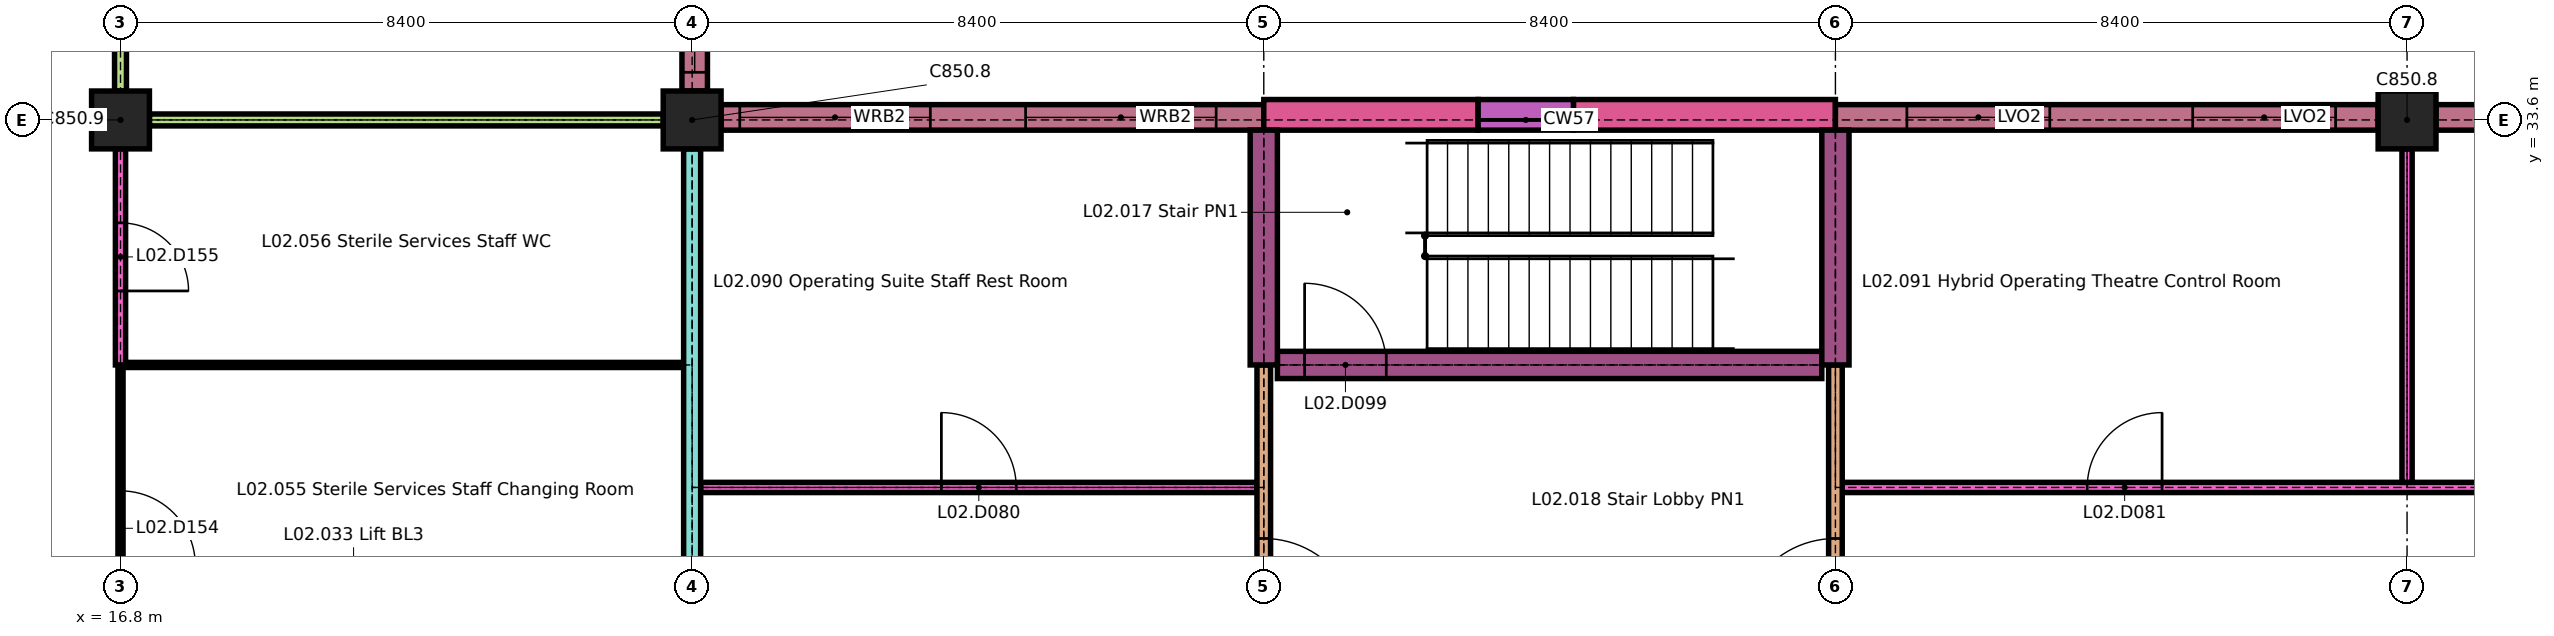
"""IFC4 building model, lengths in metres.
Left out: names, types, materials, properties, quantities, classifications, styles, units other than length and angle.
Written with IfcOpenShell. Run it as: python <this file> out.ifc"""

import sys

from ifc_helpers import new_model, si_unit, direction, frame, frame_2d, origin, origin_2d, place, context, subcontext, project, spatial, rectangle, extrude, element, fill, save


model = new_model("IFC4")
c1 = context("Model", 3, precision=1e-05, world=origin(), true_north=direction((0.0, 1.0)))
c2 = subcontext(c1, "Body", "Model", "MODEL_VIEW")
j1 = project(units=[si_unit("LENGTHUNIT", "METRE"), si_unit("PLANEANGLEUNIT", "RADIAN")], contexts=[c1])
p1 = place(None, origin())
s1 = spatial("IfcSite", under=j1, at=p1, CompositionType="ELEMENT")
p2 = place(p1, origin())
s2 = spatial("IfcBuilding", under=s1, at=p2, CompositionType="ELEMENT")
p3 = place(p2, frame((0.0, 0.0, 8.4)))
s3 = spatial("IfcBuildingStorey", under=s2, at=p3, CompositionType="ELEMENT", Elevation=8.4)
for number, where, z_axis, x_axis in (
    (1, (16.8, 33.6, 0.0), (0.0, 0.0, 1.0), (1.0, 0.0, 0.0)),
    (2, (25.2, 33.6, 0.0), (0.0, 0.0, 1.0), (1.0, 0.0, 0.0)),
    (3, (50.4, 33.6, 0.0), (0.0, 0.0, 1.0), (1.0, 0.0, 0.0)),
):
    element("IfcColumn", number, at=place(p3, frame(where, z_axis=z_axis, x_axis=x_axis)), inside=s3, PredefinedType="COLUMN", context=c2, shape_type="SweptSolid", body=[
        extrude(rectangle(XDim=0.85, YDim=0.85, at=origin_2d()), origin(), (0.0, 0.0, 1.0), 4.2),
    ])
p4 = place(p3, frame((25.625, 33.637, 0.0), z_axis=(0.0, 0.0, 1.0), x_axis=(1.0, 0.0, 0.0)))
e4 = element("IfcWall", 4, at=p4, inside=s3, PredefinedType="SOLIDWALL", context=c2, shape_type="SweptSolid", body=[
    extrude(rectangle(XDim=7.975, YDim=0.375, at=frame_2d((3.988, 0.0))), origin(), (0.0, 0.0, 1.0), 3.9),
])
p5 = place(p4, frame((0.275, 0.0, 1.0)))
e5 = element("IfcOpeningElement", 5, at=p5, cuts=e4, PredefinedType="OPENING", context=c2, shape_type="SweptSolid", body=[
    extrude(rectangle(XDim=2.8, YDim=1.5, at=frame_2d((1.4, 0.75))), frame((0.0, 0.198, 0.0), z_axis=(0.0, -1.0, 0.0), x_axis=(1.0, 0.0, 0.0)), (0.0, 0.0, 1.0), 0.395),
])
p6 = place(p4, frame((4.475, 0.0, 1.0)))
e6 = element("IfcOpeningElement", 6, at=p6, cuts=e4, PredefinedType="OPENING", context=c2, shape_type="SweptSolid", body=[
    extrude(rectangle(XDim=2.8, YDim=1.5, at=frame_2d((1.4, 0.75))), frame((0.0, 0.198, 0.0), z_axis=(0.0, -1.0, 0.0), x_axis=(1.0, 0.0, 0.0)), (0.0, 0.0, 1.0), 0.395),
])
p7 = place(p3, frame((33.6, 33.675, 0.0), z_axis=(0.0, 0.0, 1.0), x_axis=(1.0, 0.0, 0.0)))
e7 = element("IfcWall", 7, at=p7, inside=s3, PredefinedType="SOLIDWALL", context=c2, shape_type="SweptSolid", body=[
    extrude(rectangle(XDim=3.15, YDim=0.45, at=frame_2d((1.575, 0.0))), origin(), (0.0, 0.0, 1.0), 4.2),
])
p8 = place(p3, frame((38.15, 33.675, 0.0), z_axis=(0.0, 0.0, 1.0), x_axis=(1.0, 0.0, 0.0)))
e8 = element("IfcWall", 8, at=p8, inside=s3, PredefinedType="SOLIDWALL", context=c2, shape_type="SweptSolid", body=[
    extrude(rectangle(XDim=3.85, YDim=0.45, at=frame_2d((1.925, 0.0))), origin(), (0.0, 0.0, 1.0), 4.2),
])
p9 = place(p3, frame((36.75, 33.675, 0.0), z_axis=(0.0, 0.0, 1.0), x_axis=(1.0, 0.0, 0.0)))
e9 = element("IfcWall", 9, at=p9, inside=s3, PredefinedType="SOLIDWALL", context=c2, shape_type="SweptSolid", body=[
    extrude(rectangle(XDim=1.4, YDim=0.45, at=frame_2d((0.7, 0.0))), origin(), (0.0, 0.0, 1.0), 0.6),
])
p10 = place(p3, frame((42.0, 33.637, 0.0), z_axis=(0.0, 0.0, 1.0), x_axis=(1.0, 0.0, 0.0)))
e10 = element("IfcWall", 10, at=p10, inside=s3, PredefinedType="SOLIDWALL", context=c2, shape_type="SweptSolid", body=[
    extrude(rectangle(XDim=7.975, YDim=0.375, at=frame_2d((3.988, 0.0))), origin(), (0.0, 0.0, 1.0), 3.9),
])
p11 = place(p10, frame((1.05, 0.0, 0.9)))
e11 = element("IfcOpeningElement", 11, at=p11, cuts=e10, PredefinedType="OPENING", context=c2, shape_type="SweptSolid", body=[
    extrude(rectangle(XDim=2.1, YDim=2.4, at=frame_2d((1.05, 1.2))), frame((0.0, 0.198, 0.0), z_axis=(0.0, -1.0, 0.0), x_axis=(1.0, 0.0, 0.0)), (0.0, 0.0, 1.0), 0.395),
])
p12 = place(p10, frame((5.25, 0.0, 0.9)))
e12 = element("IfcOpeningElement", 12, at=p12, cuts=e10, PredefinedType="OPENING", context=c2, shape_type="SweptSolid", body=[
    extrude(rectangle(XDim=2.1, YDim=2.4, at=frame_2d((1.05, 1.2))), frame((0.0, 0.198, 0.0), z_axis=(0.0, -1.0, 0.0), x_axis=(1.0, 0.0, 0.0)), (0.0, 0.0, 1.0), 0.395),
])
p13 = place(p3, frame((50.825, 33.637, 0.0), z_axis=(0.0, 0.0, 1.0), x_axis=(1.0, 0.0, 0.0)))
e13 = element("IfcWall", 13, at=p13, inside=s3, PredefinedType="SOLIDWALL", context=c2, shape_type="SweptSolid", body=[
    extrude(rectangle(XDim=7.55, YDim=0.375, at=frame_2d((3.775, 0.0))), origin(), (0.0, 0.0, 1.0), 3.9),
])
p14 = place(p13, frame((0.925, 0.0, 0.9)))
e14 = element("IfcOpeningElement", 14, at=p14, cuts=e13, PredefinedType="OPENING", context=c2, shape_type="SweptSolid", body=[
    extrude(rectangle(XDim=1.5, YDim=2.1, at=frame_2d((0.75, 1.05))), frame((0.0, 0.198, 0.0), z_axis=(0.0, -1.0, 0.0), x_axis=(1.0, 0.0, 0.0)), (0.0, 0.0, 1.0), 0.395),
])
p15 = place(p13, frame((5.125, 0.0, 0.9)))
e15 = element("IfcOpeningElement", 15, at=p15, cuts=e13, PredefinedType="OPENING", context=c2, shape_type="SweptSolid", body=[
    extrude(rectangle(XDim=1.5, YDim=2.1, at=frame_2d((0.75, 1.05))), frame((0.0, 0.198, 0.0), z_axis=(0.0, -1.0, 0.0), x_axis=(1.0, 0.0, 0.0)), (0.0, 0.0, 1.0), 0.395),
])
p16 = place(p3, frame((25.238, 34.025, 0.0), z_axis=(0.0, 0.0, 1.0), x_axis=(0.0, 1.0, 0.0)))
e16 = element("IfcWall", 16, at=p16, inside=s3, PredefinedType="SOLIDWALL", context=c2, shape_type="SweptSolid", body=[
    extrude(rectangle(XDim=7.975, YDim=0.375, at=frame_2d((3.988, 0.0))), origin(), (0.0, 0.0, 1.0), 3.9),
])
p17 = place(p16, frame((0.275, 0.0, 1.0)))
e17 = element("IfcOpeningElement", 17, at=p17, cuts=e16, PredefinedType="OPENING", context=c2, shape_type="SweptSolid", body=[
    extrude(rectangle(XDim=2.8, YDim=1.5, at=frame_2d((1.4, 0.75))), frame((0.0, 0.198, 0.0), z_axis=(0.0, -1.0, 0.0), x_axis=(1.0, 0.0, 0.0)), (0.0, 0.0, 1.0), 0.395),
])
p18 = place(p16, frame((4.475, 0.0, 1.0)))
e18 = element("IfcOpeningElement", 18, at=p18, cuts=e16, PredefinedType="OPENING", context=c2, shape_type="SweptSolid", body=[
    extrude(rectangle(XDim=2.8, YDim=1.5, at=frame_2d((1.4, 0.75))), frame((0.0, 0.198, 0.0), z_axis=(0.0, -1.0, 0.0), x_axis=(1.0, 0.0, 0.0)), (0.0, 0.0, 1.0), 0.395),
])
p19 = place(p3, frame((25.325, 28.2, 0.0), z_axis=(0.0, 0.0, 1.0), x_axis=(1.0, 0.0, 0.0)))
e19 = element("IfcWall", 19, at=p19, inside=s3, PredefinedType="PARTITIONING", context=c2, shape_type="SweptSolid", body=[
    extrude(rectangle(XDim=8.175, YDim=0.15, at=frame_2d((4.087, 0.0))), origin(), (0.0, 0.0, 1.0), 4.2),
])
p20 = place(p19, frame((3.538, 0.0, 0.0)))
e20 = element("IfcOpeningElement", 20, at=p20, cuts=e19, PredefinedType="OPENING", context=c2, shape_type="SweptSolid", body=[
    extrude(rectangle(XDim=1.1, YDim=2.1, at=frame_2d((0.55, 1.05))), frame((0.0, 0.085, 0.0), z_axis=(0.0, -1.0, 0.0), x_axis=(1.0, 0.0, 0.0)), (0.0, 0.0, 1.0), 0.17),
])
p21 = place(p3, frame((42.1, 28.2, 0.0), z_axis=(0.0, 0.0, 1.0), x_axis=(1.0, 0.0, 0.0)))
e21 = element("IfcWall", 21, at=p21, inside=s3, PredefinedType="PARTITIONING", context=c2, shape_type="SweptSolid", body=[
    extrude(rectangle(XDim=41.9, YDim=0.15, at=frame_2d((20.95, 0.0))), origin(), (0.0, 0.0, 1.0), 4.2),
])
p22 = place(p21, frame((3.6, 0.0, 0.0)))
e22 = element("IfcOpeningElement", 22, at=p22, cuts=e21, PredefinedType="OPENING", context=c2, shape_type="SweptSolid", body=[
    extrude(rectangle(XDim=1.1, YDim=2.1, at=frame_2d((0.55, 1.05))), frame((0.0, 0.085, 0.0), z_axis=(0.0, -1.0, 0.0), x_axis=(1.0, 0.0, 0.0)), (0.0, 0.0, 1.0), 0.17),
])
p23 = place(p21, frame((11.95, 0.0, 0.0)))
e23 = element("IfcOpeningElement", 23, at=p23, cuts=e21, PredefinedType="OPENING", context=c2, shape_type="SweptSolid", body=[
    extrude(rectangle(XDim=1.1, YDim=2.1, at=frame_2d((0.55, 1.05))), frame((0.0, 0.085, 0.0), z_axis=(0.0, -1.0, 0.0), x_axis=(1.0, 0.0, 0.0)), (0.0, 0.0, 1.0), 0.17),
])
p24 = place(p21, frame((20.35, 0.0, 0.0)))
e24 = element("IfcOpeningElement", 24, at=p24, cuts=e21, PredefinedType="OPENING", context=c2, shape_type="SweptSolid", body=[
    extrude(rectangle(XDim=1.1, YDim=2.1, at=frame_2d((0.55, 1.05))), frame((0.0, 0.085, 0.0), z_axis=(0.0, -1.0, 0.0), x_axis=(1.0, 0.0, 0.0)), (0.0, 0.0, 1.0), 0.17),
])
p25 = place(p21, frame((28.75, 0.0, 0.0)))
e25 = element("IfcOpeningElement", 25, at=p25, cuts=e21, PredefinedType="OPENING", context=c2, shape_type="SweptSolid", body=[
    extrude(rectangle(XDim=1.1, YDim=2.1, at=frame_2d((0.55, 1.05))), frame((0.0, 0.085, 0.0), z_axis=(0.0, -1.0, 0.0), x_axis=(1.0, 0.0, 0.0)), (0.0, 0.0, 1.0), 0.17),
])
p26 = place(p21, frame((37.15, 0.0, 0.0)))
e26 = element("IfcOpeningElement", 26, at=p26, cuts=e21, PredefinedType="OPENING", context=c2, shape_type="SweptSolid", body=[
    extrude(rectangle(XDim=1.1, YDim=2.1, at=frame_2d((0.55, 1.05))), frame((0.0, 0.085, 0.0), z_axis=(0.0, -1.0, 0.0), x_axis=(1.0, 0.0, 0.0)), (0.0, 0.0, 1.0), 0.17),
])
p27 = place(p3, frame((16.875, 30.0, 0.0), z_axis=(0.0, 0.0, 1.0), x_axis=(1.0, 0.0, 0.0)))
e27 = element("IfcWall", 27, at=p27, inside=s3, PredefinedType="PARTITIONING", context=c2, shape_type="SweptSolid", body=[
    extrude(rectangle(XDim=8.2, YDim=0.075, at=frame_2d((4.1, 0.0))), origin(), (0.0, 0.0, 1.0), 4.2),
])
p28 = place(p3, frame((33.8, 30.0, 0.0), z_axis=(0.0, 0.0, 1.0), x_axis=(1.0, 0.0, 0.0)))
e28 = element("IfcWall", 28, at=p28, inside=s3, PredefinedType="SHEAR", context=c2, shape_type="SweptSolid", body=[
    extrude(rectangle(XDim=8.0, YDim=0.4, at=frame_2d((4.0, 0.0))), origin(), (0.0, 0.0, 1.0), 4.2),
])
p29 = place(p28, frame((0.4, 0.0, 0.0)))
e29 = element("IfcOpeningElement", 29, at=p29, cuts=e28, PredefinedType="OPENING", context=c2, shape_type="SweptSolid", body=[
    extrude(rectangle(XDim=1.2, YDim=2.1, at=frame_2d((0.6, 1.05))), frame((0.0, 0.21, 0.0), z_axis=(0.0, -1.0, 0.0), x_axis=(1.0, 0.0, 0.0)), (0.0, 0.0, 1.0), 0.42),
])
p30 = place(p3, frame((17.225, 33.6, 0.0), z_axis=(0.0, 0.0, 1.0), x_axis=(1.0, 0.0, 0.0)))
e30 = element("IfcWall", 30, at=p30, inside=s3, PredefinedType="PARTITIONING", context=c2, shape_type="SweptSolid", body=[
    extrude(rectangle(XDim=7.55, YDim=0.175, at=frame_2d((3.775, 0.0))), origin(), (0.0, 0.0, 1.0), 4.2),
])
p31 = place(p3, frame((16.8, 25.2, 0.0), z_axis=(0.0, 0.0, 1.0), x_axis=(0.0, 1.0, 0.0)))
e31 = element("IfcWall", 31, at=p31, inside=s3, PredefinedType="PARTITIONING", context=c2, shape_type="SweptSolid", body=[
    extrude(rectangle(XDim=4.8, YDim=0.075, at=frame_2d((2.4, 0.0))), origin(), (0.0, 0.0, 1.0), 4.2),
])
p32 = place(p31, frame((1.85, 0.0, 0.0)))
e32 = element("IfcOpeningElement", 32, at=p32, cuts=e31, PredefinedType="OPENING", context=c2, shape_type="SweptSolid", body=[
    extrude(rectangle(XDim=1.1, YDim=2.1, at=frame_2d((0.55, 1.05))), frame((0.0, 0.047, 0.0), z_axis=(0.0, -1.0, 0.0), x_axis=(1.0, 0.0, 0.0)), (0.0, 0.0, 1.0), 0.095),
])
p33 = place(p3, frame((16.8, 30.0, 0.0), z_axis=(0.0, 0.0, 1.0), x_axis=(0.0, 1.0, 0.0)))
e33 = element("IfcWall", 33, at=p33, inside=s3, PredefinedType="PARTITIONING", context=c2, shape_type="SweptSolid", body=[
    extrude(rectangle(XDim=3.175, YDim=0.15, at=frame_2d((1.587, 0.0))), origin(), (0.0, 0.0, 1.0), 4.2),
])
p34 = place(p33, frame((1.087, 0.0, 0.0)))
e34 = element("IfcOpeningElement", 34, at=p34, cuts=e33, PredefinedType="OPENING", context=c2, shape_type="SweptSolid", body=[
    extrude(rectangle(XDim=1.0, YDim=2.1, at=frame_2d((0.5, 1.05))), frame((0.0, 0.085, 0.0), z_axis=(0.0, -1.0, 0.0), x_axis=(1.0, 0.0, 0.0)), (0.0, 0.0, 1.0), 0.17),
])
p35 = place(p3, frame((16.8, 34.025, 0.0), z_axis=(0.0, 0.0, 1.0), x_axis=(0.0, 1.0, 0.0)))
e35 = element("IfcWall", 35, at=p35, inside=s3, PredefinedType="PARTITIONING", context=c2, shape_type="SweptSolid", body=[
    extrude(rectangle(XDim=7.975, YDim=0.175, at=frame_2d((3.988, 0.0))), origin(), (0.0, 0.0, 1.0), 4.2),
])
p36 = place(p35, frame((3.438, 0.0, 0.0)))
e36 = element("IfcOpeningElement", 36, at=p36, cuts=e35, PredefinedType="OPENING", context=c2, shape_type="SweptSolid", body=[
    extrude(rectangle(XDim=1.1, YDim=2.1, at=frame_2d((0.55, 1.05))), frame((0.0, 0.097, 0.0), z_axis=(0.0, -1.0, 0.0), x_axis=(1.0, 0.0, 0.0)), (0.0, 0.0, 1.0), 0.195),
])
p37 = place(p3, frame((25.2, 25.2, 0.0), z_axis=(0.0, 0.0, 1.0), x_axis=(0.0, 1.0, 0.0)))
e37 = element("IfcWall", 37, at=p37, inside=s3, PredefinedType="SOLIDWALL", context=c2, shape_type="SweptSolid", body=[
    extrude(rectangle(XDim=7.975, YDim=0.25, at=frame_2d((3.988, 0.0))), origin(), (0.0, 0.0, 1.0), 4.2),
])
p38 = place(p3, frame((33.6, 25.3, 0.0), z_axis=(0.0, 0.0, 1.0), x_axis=(0.0, 1.0, 0.0)))
e38 = element("IfcWall", 38, at=p38, inside=s3, PredefinedType="PARTITIONING", context=c2, shape_type="SweptSolid", body=[
    extrude(rectangle(XDim=4.7, YDim=0.2, at=frame_2d((2.35, 0.0))), origin(), (0.0, 0.0, 1.0), 4.2),
])
p39 = place(p38, frame((0.75, 0.0, 0.0)))
e39 = element("IfcOpeningElement", 39, at=p39, cuts=e38, PredefinedType="OPENING", context=c2, shape_type="SweptSolid", body=[
    extrude(rectangle(XDim=1.4, YDim=2.1, at=frame_2d((0.7, 1.05))), frame((0.0, 0.11, 0.0), z_axis=(0.0, -1.0, 0.0), x_axis=(1.0, 0.0, 0.0)), (0.0, 0.0, 1.0), 0.22),
])
p40 = place(p3, frame((33.6, 30.0, 0.0), z_axis=(0.0, 0.0, 1.0), x_axis=(0.0, 1.0, 0.0)))
e40 = element("IfcWall", 40, at=p40, inside=s3, PredefinedType="SHEAR", context=c2, shape_type="SweptSolid", body=[
    extrude(rectangle(XDim=3.45, YDim=0.4, at=frame_2d((1.725, 0.0))), origin(), (0.0, 0.0, 1.0), 4.2),
])
p41 = place(p3, frame((42.0, 25.3, 0.0), z_axis=(0.0, 0.0, 1.0), x_axis=(0.0, 1.0, 0.0)))
e41 = element("IfcWall", 41, at=p41, inside=s3, PredefinedType="PARTITIONING", context=c2, shape_type="SweptSolid", body=[
    extrude(rectangle(XDim=4.7, YDim=0.2, at=frame_2d((2.35, 0.0))), origin(), (0.0, 0.0, 1.0), 4.2),
])
p42 = place(p41, frame((0.75, 0.0, 0.0)))
e42 = element("IfcOpeningElement", 42, at=p42, cuts=e41, PredefinedType="OPENING", context=c2, shape_type="SweptSolid", body=[
    extrude(rectangle(XDim=1.4, YDim=2.1, at=frame_2d((0.7, 1.05))), frame((0.0, 0.11, 0.0), z_axis=(0.0, -1.0, 0.0), x_axis=(1.0, 0.0, 0.0)), (0.0, 0.0, 1.0), 0.22),
])
p43 = place(p3, frame((42.0, 30.0, 0.0), z_axis=(0.0, 0.0, 1.0), x_axis=(0.0, 1.0, 0.0)))
e43 = element("IfcWall", 43, at=p43, inside=s3, PredefinedType="SHEAR", context=c2, shape_type="SweptSolid", body=[
    extrude(rectangle(XDim=3.45, YDim=0.4, at=frame_2d((1.725, 0.0))), origin(), (0.0, 0.0, 1.0), 4.2),
])
p44 = place(p3, frame((50.4, 28.275, 0.0), z_axis=(0.0, 0.0, 1.0), x_axis=(0.0, 1.0, 0.0)))
e44 = element("IfcWall", 44, at=p44, inside=s3, PredefinedType="PARTITIONING", context=c2, shape_type="SweptSolid", body=[
    extrude(rectangle(XDim=4.9, YDim=0.15, at=frame_2d((2.45, 0.0))), origin(), (0.0, 0.0, 1.0), 4.2),
])
p45 = place(p5, origin())
e45 = element("IfcWindow", 45, at=p45, inside=s3, PartitioningType="DOUBLE_PANEL_VERTICAL", PredefinedType="WINDOW", context=c2, shape_type="SweptSolid", body=[
    extrude(rectangle(XDim=2.8, YDim=1.5, at=frame_2d((1.4, 0.75))), frame((0.0, 0.03, 0.0), z_axis=(0.0, -1.0, 0.0), x_axis=(1.0, 0.0, 0.0)), (0.0, 0.0, 1.0), 0.06),
])
fill(e5, e45)
p46 = place(p6, origin())
e46 = element("IfcWindow", 46, at=p46, inside=s3, PartitioningType="DOUBLE_PANEL_VERTICAL", PredefinedType="WINDOW", context=c2, shape_type="SweptSolid", body=[
    extrude(rectangle(XDim=2.8, YDim=1.5, at=frame_2d((1.4, 0.75))), frame((0.0, 0.03, 0.0), z_axis=(0.0, -1.0, 0.0), x_axis=(1.0, 0.0, 0.0)), (0.0, 0.0, 1.0), 0.06),
])
fill(e6, e46)
p47 = place(p11, origin())
e47 = element("IfcWindow", 47, at=p47, inside=s3, PartitioningType="SINGLE_PANEL", PredefinedType="WINDOW", context=c2, shape_type="SweptSolid", body=[
    extrude(rectangle(XDim=2.1, YDim=2.4, at=frame_2d((1.05, 1.2))), frame((0.0, 0.075, 0.0), z_axis=(0.0, -1.0, 0.0), x_axis=(1.0, 0.0, 0.0)), (0.0, 0.0, 1.0), 0.15),
])
fill(e11, e47)
p48 = place(p12, origin())
e48 = element("IfcWindow", 48, at=p48, inside=s3, PartitioningType="SINGLE_PANEL", PredefinedType="WINDOW", context=c2, shape_type="SweptSolid", body=[
    extrude(rectangle(XDim=2.1, YDim=2.4, at=frame_2d((1.05, 1.2))), frame((0.0, 0.075, 0.0), z_axis=(0.0, -1.0, 0.0), x_axis=(1.0, 0.0, 0.0)), (0.0, 0.0, 1.0), 0.15),
])
fill(e12, e48)
p49 = place(p17, origin())
e49 = element("IfcWindow", 49, at=p49, inside=s3, PartitioningType="DOUBLE_PANEL_VERTICAL", PredefinedType="WINDOW", context=c2, shape_type="SweptSolid", body=[
    extrude(rectangle(XDim=2.8, YDim=1.5, at=frame_2d((1.4, 0.75))), frame((0.0, 0.03, 0.0), z_axis=(0.0, -1.0, 0.0), x_axis=(1.0, 0.0, 0.0)), (0.0, 0.0, 1.0), 0.06),
])
fill(e17, e49)
p50 = place(p20, origin())
e50 = element("IfcDoor", 50, at=p50, inside=s3, OperationType="SINGLE_SWING_RIGHT", PredefinedType="DOOR", context=c2, shape_type="SweptSolid", body=[
    extrude(rectangle(XDim=1.1, YDim=2.1, at=frame_2d((0.55, 1.05))), frame((0.0, 0.025, 0.0), z_axis=(0.0, -1.0, 0.0), x_axis=(1.0, 0.0, 0.0)), (0.0, 0.0, 1.0), 0.05),
])
fill(e20, e50)
p51 = place(p22, origin())
e51 = element("IfcDoor", 51, at=p51, inside=s3, OperationType="SINGLE_SWING_LEFT", PredefinedType="DOOR", context=c2, shape_type="SweptSolid", body=[
    extrude(rectangle(XDim=1.1, YDim=2.1, at=frame_2d((0.55, 1.05))), frame((0.0, 0.025, 0.0), z_axis=(0.0, -1.0, 0.0), x_axis=(1.0, 0.0, 0.0)), (0.0, 0.0, 1.0), 0.05),
])
fill(e22, e51)
p52 = place(p29, origin())
e52 = element("IfcDoor", 52, at=p52, inside=s3, OperationType="SINGLE_SWING_RIGHT", PredefinedType="DOOR", context=c2, shape_type="SweptSolid", body=[
    extrude(rectangle(XDim=1.2, YDim=2.1, at=frame_2d((0.6, 1.05))), frame((0.0, 0.025, 0.0), z_axis=(0.0, -1.0, 0.0), x_axis=(1.0, 0.0, 0.0)), (0.0, 0.0, 1.0), 0.05),
])
fill(e29, e52)
p53 = place(p32, origin())
e53 = element("IfcDoor", 53, at=p53, inside=s3, OperationType="SINGLE_SWING_LEFT", PredefinedType="DOOR", context=c2, shape_type="SweptSolid", body=[
    extrude(rectangle(XDim=1.1, YDim=2.1, at=frame_2d((0.55, 1.05))), frame((0.0, 0.025, 0.0), z_axis=(0.0, -1.0, 0.0), x_axis=(1.0, 0.0, 0.0)), (0.0, 0.0, 1.0), 0.05),
])
fill(e32, e53)
p54 = place(p34, origin())
e54 = element("IfcDoor", 54, at=p54, inside=s3, OperationType="SINGLE_SWING_LEFT", PredefinedType="DOOR", context=c2, shape_type="SweptSolid", body=[
    extrude(rectangle(XDim=1.0, YDim=2.1, at=frame_2d((0.5, 1.05))), frame((0.0, 0.025, 0.0), z_axis=(0.0, -1.0, 0.0), x_axis=(1.0, 0.0, 0.0)), (0.0, 0.0, 1.0), 0.05),
])
fill(e34, e54)
p55 = place(p39, origin())
e55 = element("IfcDoor", 55, at=p55, inside=s3, OperationType="SINGLE_SWING_LEFT", PredefinedType="DOOR", context=c2, shape_type="SweptSolid", body=[
    extrude(rectangle(XDim=1.4, YDim=2.1, at=frame_2d((0.7, 1.05))), frame((0.0, 0.03, 0.0), z_axis=(0.0, -1.0, 0.0), x_axis=(1.0, 0.0, 0.0)), (0.0, 0.0, 1.0), 0.06),
])
fill(e39, e55)
p56 = place(p42, origin())
e56 = element("IfcDoor", 56, at=p56, inside=s3, OperationType="SINGLE_SWING_RIGHT", PredefinedType="DOOR", context=c2, shape_type="SweptSolid", body=[
    extrude(rectangle(XDim=1.4, YDim=2.1, at=frame_2d((0.7, 1.05))), frame((0.0, 0.03, 0.0), z_axis=(0.0, -1.0, 0.0), x_axis=(1.0, 0.0, 0.0)), (0.0, 0.0, 1.0), 0.06),
])
fill(e42, e56)
save(model, sys.argv[1])
